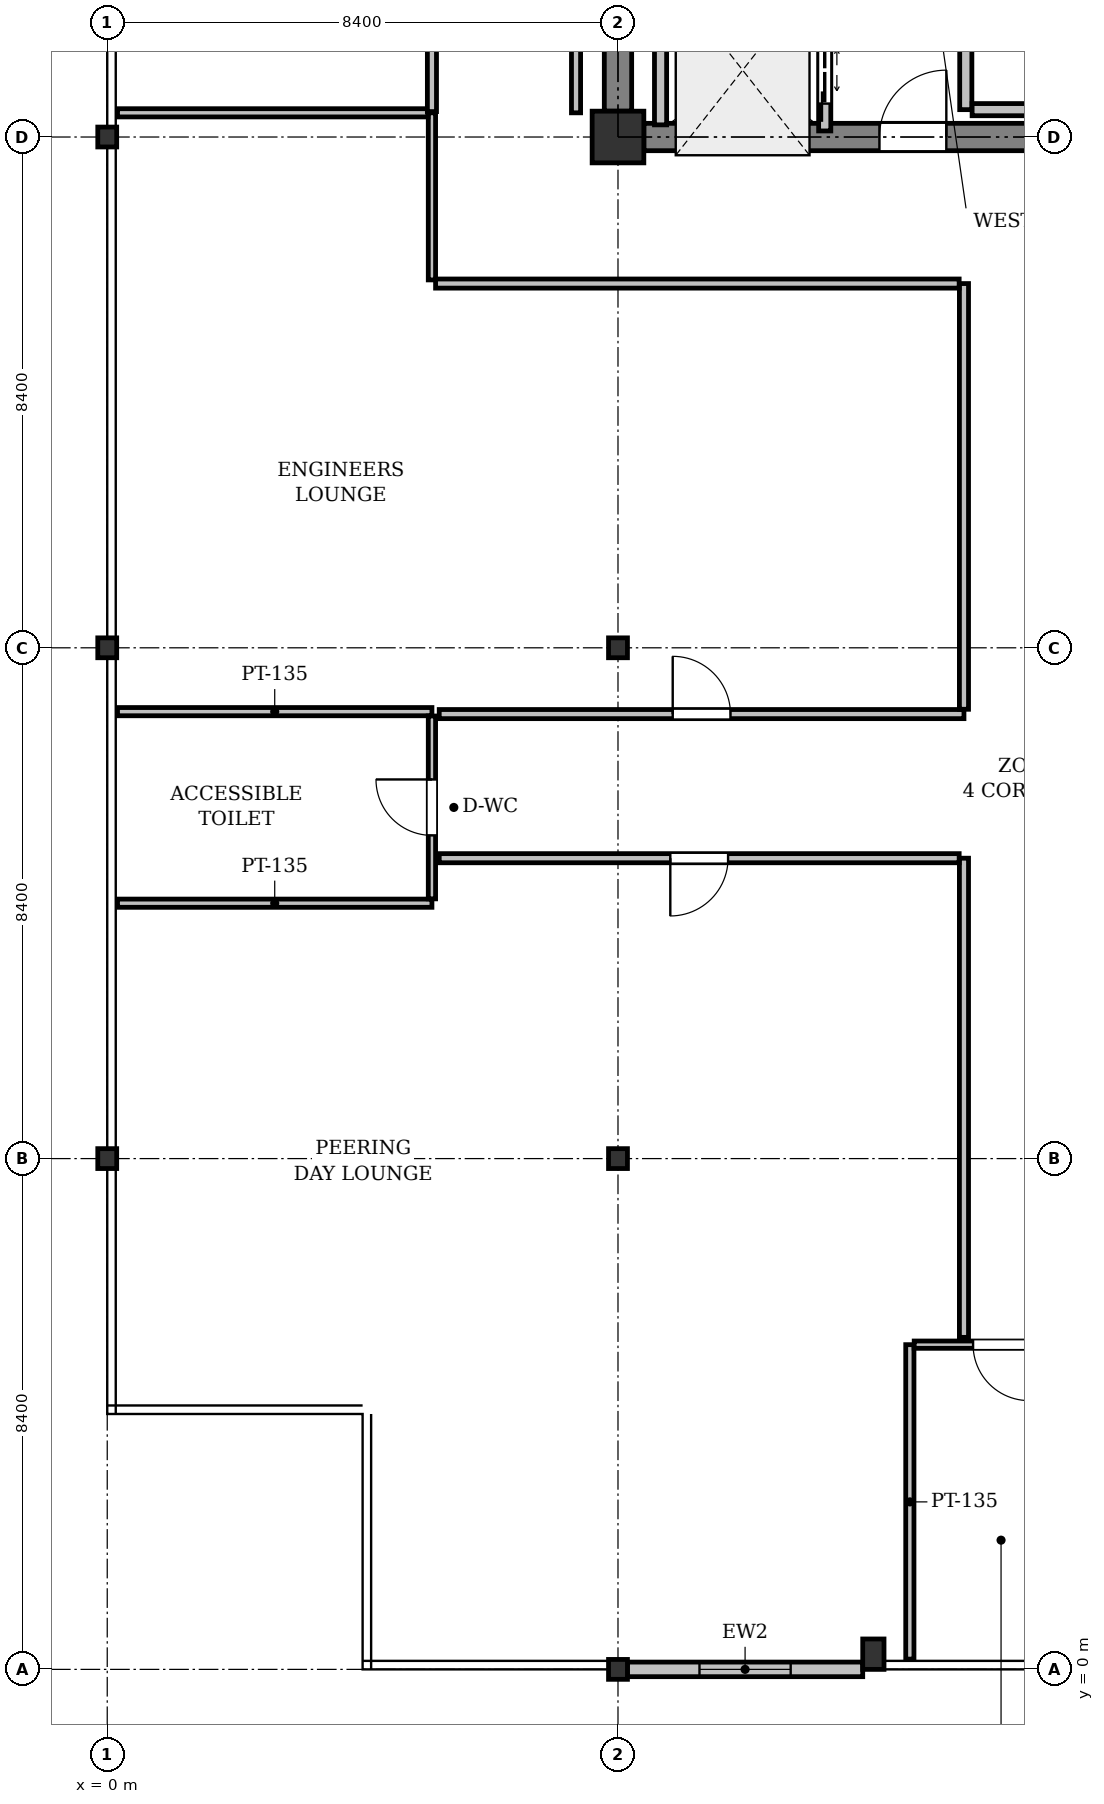
"""IFC4 building model, lengths in metres.
Left out: names, types, materials, properties, quantities, classifications, styles, units other than length and angle.
Written with IfcOpenShell. Run it as: python <this file> out.ifc"""

import sys

from ifc_helpers import new_model, si_unit, direction, frame, frame_2d, origin, origin_2d, place, context, subcontext, project, spatial, rectangle, i_section, extrude, element, fill, save


model = new_model("IFC4")
c1 = context("Model", 3, precision=1e-05, world=origin(), true_north=direction((0.0, 1.0)))
c2 = subcontext(c1, "Body", "Model", "MODEL_VIEW")
j1 = project(units=[si_unit("LENGTHUNIT", "METRE"), si_unit("PLANEANGLEUNIT", "RADIAN")], contexts=[c1])
p1 = place(None, origin())
s1 = spatial("IfcSite", under=j1, at=p1, CompositionType="ELEMENT")
p2 = place(p1, origin())
s2 = spatial("IfcBuilding", under=s1, at=p2, CompositionType="ELEMENT")
p3 = place(p2, frame((0.0, 0.0, 262.2)))
s3 = spatial("IfcBuildingStorey", under=s2, at=p3, CompositionType="ELEMENT", Elevation=262.2)
for number, where, z_axis, x_axis in (
    (1, (0.0, 8.4, 0.0), (0.0, 0.0, 1.0), (1.0, 0.0, 0.0)),
    (2, (0.0, 16.8, 0.0), (0.0, 0.0, 1.0), (1.0, 0.0, 0.0)),
    (3, (0.0, 25.2, 0.0), (0.0, 0.0, 1.0), (1.0, 0.0, 0.0)),
    (4, (8.4, 0.0, 0.0), (0.0, 0.0, 1.0), (1.0, 0.0, 0.0)),
    (5, (8.4, 8.4, 0.0), (0.0, 0.0, 1.0), (1.0, 0.0, 0.0)),
    (6, (8.4, 16.8, 0.0), (0.0, 0.0, 1.0), (1.0, 0.0, 0.0)),
):
    element("IfcColumn", number, at=place(p3, frame(where, z_axis=z_axis, x_axis=x_axis)), inside=s3, PredefinedType="COLUMN", context=c2, shape_type="SweptSolid", body=[
        extrude(i_section(OverallWidth=0.311, OverallDepth=0.327, WebThickness=0.016, FlangeThickness=0.025, FilletRadius=0.017, at=origin_2d()), origin(), (0.0, 0.0, 1.0), 4.0),
    ])
p4 = place(p3, frame((8.4, 25.2, 0.0), z_axis=(0.0, 0.0, 1.0), x_axis=(1.0, 0.0, 0.0)))
e7 = element("IfcColumn", 7, at=p4, inside=s3, PredefinedType="COLUMN", context=c2, shape_type="SweptSolid", body=[
    extrude(rectangle(XDim=0.85, YDim=0.85, at=origin_2d()), origin(), (0.0, 0.0, 1.0), 4.0),
])
p5 = place(p3, frame((12.6, 0.25, 0.0), z_axis=(0.0, 0.0, 1.0), x_axis=(1.0, 0.0, 0.0)))
e8 = element("IfcColumn", 8, at=p5, inside=s3, PredefinedType="PILASTER", context=c2, shape_type="SweptSolid", body=[
    extrude(rectangle(XDim=0.35, YDim=0.5, at=origin_2d()), origin(), (0.0, 0.0, 1.0), 4.0),
])
p6 = place(p3, frame((12.425, 0.0, 0.0), z_axis=(0.0, 0.0, 1.0), x_axis=(-1.0, 0.0, 0.0)))
e9 = element("IfcWall", 9, at=p6, inside=s3, PredefinedType="STANDARD", context=c2, shape_type="SweptSolid", body=[
    extrude(rectangle(XDim=3.87, YDim=0.24, at=frame_2d((1.935, 0.0))), origin(), (0.0, 0.0, 1.0), 3.475),
])
p7 = place(p6, frame((1.185, 0.0, 0.9)))
e10 = element("IfcOpeningElement", 10, at=p7, cuts=e9, PredefinedType="OPENING", context=c2, shape_type="SweptSolid", body=[
    extrude(rectangle(XDim=1.5, YDim=1.6, at=frame_2d((0.75, 0.8))), frame((0.0, 0.13, 0.0), z_axis=(0.0, -1.0, 0.0), x_axis=(1.0, 0.0, 0.0)), (0.0, 0.0, 1.0), 0.26),
])
p8 = place(p3, frame((8.4, 25.625, 0.0), z_axis=(0.0, 0.0, 1.0), x_axis=(0.0, 1.0, 0.0)))
e11 = element("IfcWall", 11, at=p8, inside=s3, PredefinedType="SHEAR", context=c2, shape_type="SweptSolid", body=[
    extrude(rectangle(XDim=7.55, YDim=0.45, at=frame_2d((3.775, 0.0))), origin(), (0.0, 0.0, 1.0), 3.725),
])
p9 = place(p3, frame((8.825, 25.2, 0.0), z_axis=(0.0, 0.0, 1.0), x_axis=(1.0, 0.0, 0.0)))
e12 = element("IfcWall", 12, at=p9, inside=s3, PredefinedType="SHEAR", context=c2, shape_type="SweptSolid", body=[
    extrude(rectangle(XDim=7.55, YDim=0.45, at=frame_2d((3.775, 0.0))), origin(), (0.0, 0.0, 1.0), 3.725),
])
p10 = place(p9, frame((3.875, 0.0, 0.0)))
e13 = element("IfcOpeningElement", 13, at=p10, cuts=e12, PredefinedType="OPENING", context=c2, shape_type="SweptSolid", body=[
    extrude(rectangle(XDim=1.1, YDim=2.15, at=frame_2d((0.55, 1.075))), frame((0.0, 0.235, 0.0), z_axis=(0.0, -1.0, 0.0), x_axis=(1.0, 0.0, 0.0)), (0.0, 0.0, 1.0), 0.47),
])
p11 = place(p3, frame((11.8, 25.3, 0.0), z_axis=(0.0, 0.0, 1.0), x_axis=(0.0, 1.0, 0.0)))
e14 = element("IfcWall", 14, at=p11, inside=s3, PredefinedType="PARTITIONING", context=c2, shape_type="SweptSolid", body=[
    extrude(rectangle(XDim=2.0, YDim=0.2, at=frame_2d((1.0, 0.0))), origin(), (0.0, 0.0, 1.0), 3.725),
])
p12 = place(p11, frame((0.45, 0.0, 0.0)))
e15 = element("IfcOpeningElement", 15, at=p12, cuts=e14, PredefinedType="OPENING", context=c2, shape_type="SweptSolid", body=[
    extrude(rectangle(XDim=1.1, YDim=2.2, at=frame_2d((0.55, 1.1))), frame((0.0, 0.11, 0.0), z_axis=(0.0, -1.0, 0.0), x_axis=(1.0, 0.0, 0.0)), (0.0, 0.0, 1.0), 0.22),
])
p13 = place(p3, frame((9.1, 25.4, 0.0), z_axis=(0.0, 0.0, 1.0), x_axis=(0.0, 1.0, 0.0)))
e16 = element("IfcWall", 16, at=p13, inside=s3, PredefinedType="PARTITIONING", context=c2, shape_type="SweptSolid", body=[
    extrude(rectangle(XDim=1.8, YDim=0.2, at=frame_2d((0.9, 0.0))), origin(), (0.0, 0.0, 1.0), 3.725),
])
p14 = place(p3, frame((14.12, 30.746, 0.0), z_axis=(0.0, 0.0, 1.0), x_axis=(0.0, -1.0, 0.0)))
e17 = element("IfcWall", 17, at=p14, inside=s3, PredefinedType="PARTITIONING", context=c2, shape_type="SweptSolid", body=[
    extrude(rectangle(XDim=5.096, YDim=0.2, at=frame_2d((2.548, 0.0))), origin(), (0.0, 0.0, 1.0), 3.725),
])
p15 = place(p14, frame((2.123, 0.0, 0.0)))
e18 = element("IfcOpeningElement", 18, at=p15, cuts=e17, PredefinedType="OPENING", context=c2, shape_type="SweptSolid", body=[
    extrude(rectangle(XDim=0.85, YDim=2.15, at=frame_2d((0.425, 1.075))), frame((0.0, 0.11, 0.0), z_axis=(0.0, -1.0, 0.0), x_axis=(1.0, 0.0, 0.0)), (0.0, 0.0, 1.0), 0.22),
])
p16 = place(p3, frame((14.224, 25.65, 0.0), z_axis=(0.0, 0.0, 1.0), x_axis=(1.0, 0.0, 0.0)))
e19 = element("IfcWall", 19, at=p16, inside=s3, PredefinedType="PARTITIONING", context=c2, shape_type="SweptSolid", body=[
    extrude(rectangle(XDim=2.122, YDim=0.2, at=frame_2d((1.061, 0.0))), origin(), (0.0, 0.0, 1.0), 3.725),
])
for number, where, z_axis, x_axis in (
    (20, (5.34, 15.75, 0.0), (0.0, 0.0, 1.0), (-1.0, 0.0, 0.0)),
    (21, (0.169, 12.6, 0.0), (0.0, 0.0, 1.0), (1.0, 0.0, 0.0)),
):
    element("IfcWall", number, at=place(p3, frame(where, z_axis=z_axis, x_axis=x_axis)), inside=s3, PredefinedType="PARTITIONING", context=c2, shape_type="SweptSolid", body=[
        extrude(rectangle(XDim=5.171, YDim=0.135, at=frame_2d((2.585, 0.0))), origin(), (0.0, 0.0, 1.0), 3.421),
    ])
p17 = place(p3, frame((5.34, 12.671, 0.0), z_axis=(0.0, 0.0, 1.0), x_axis=(0.0, 1.0, 0.0)))
e22 = element("IfcWall", 22, at=p17, inside=s3, PredefinedType="PARTITIONING", context=c2, shape_type="SweptSolid", body=[
    extrude(rectangle(XDim=3.007, YDim=0.12, at=frame_2d((1.503, 0.0))), origin(), (0.0, 0.0, 1.0), 3.725),
])
p18 = place(p17, frame((1.043, 0.0, 0.0)))
e23 = element("IfcOpeningElement", 23, at=p18, cuts=e22, PredefinedType="OPENING", context=c2, shape_type="SweptSolid", body=[
    extrude(rectangle(XDim=0.92, YDim=2.1, at=frame_2d((0.46, 1.05))), frame((0.0, 0.07, 0.0), z_axis=(0.0, -1.0, 0.0), x_axis=(1.0, 0.0, 0.0)), (0.0, 0.0, 1.0), 0.14),
])
p19 = place(p3, frame((13.2, 5.34, 0.0), z_axis=(0.0, 0.0, 1.0), x_axis=(0.0, -1.0, 0.0)))
e24 = element("IfcWall", 24, at=p19, inside=s3, PredefinedType="PARTITIONING", context=c2, shape_type="SweptSolid", body=[
    extrude(rectangle(XDim=5.171, YDim=0.135, at=frame_2d((2.585, 0.0))), origin(), (0.0, 0.0, 1.0), 3.725),
])
p20 = place(p3, frame((16.128, 5.34, 0.0), z_axis=(0.0, 0.0, 1.0), x_axis=(-1.0, 0.0, 0.0)))
e25 = element("IfcWall", 25, at=p20, inside=s3, PredefinedType="PARTITIONING", context=c2, shape_type="SweptSolid", body=[
    extrude(rectangle(XDim=2.857, YDim=0.12, at=frame_2d((1.428, 0.0))), origin(), (0.0, 0.0, 1.0), 3.725),
])
p21 = place(p20, frame((0.969, 0.0, 0.0)))
e26 = element("IfcOpeningElement", 26, at=p21, cuts=e25, PredefinedType="OPENING", context=c2, shape_type="SweptSolid", body=[
    extrude(rectangle(XDim=0.92, YDim=2.1, at=frame_2d((0.46, 1.05))), frame((0.0, 0.07, 0.0), z_axis=(0.0, -1.0, 0.0), x_axis=(1.0, 0.0, 0.0)), (0.0, 0.0, 1.0), 0.14),
])
p22 = place(p3, frame((5.34, 22.85, 0.0), z_axis=(0.0, 0.0, 1.0), x_axis=(0.0, 1.0, 0.0)))
e27 = element("IfcWall", 27, at=p22, inside=s3, PredefinedType="PARTITIONING", context=c2, shape_type="SweptSolid", body=[
    extrude(rectangle(XDim=2.748, YDim=0.12, at=frame_2d((1.374, 0.0))), origin(), (0.0, 0.0, 1.0), 3.271),
])
p23 = place(p3, frame((5.276, 25.598, 0.0), z_axis=(0.0, 0.0, 1.0), x_axis=(-1.0, 0.0, 0.0)))
e28 = element("IfcWall", 28, at=p23, inside=s3, PredefinedType="PARTITIONING", context=c2, shape_type="SweptSolid", body=[
    extrude(rectangle(XDim=5.107, YDim=0.135, at=frame_2d((2.553, 0.0))), origin(), (0.0, 0.0, 1.0), 3.421),
])
p24 = place(p3, frame((5.46, 15.71, 0.0), z_axis=(0.0, 0.0, 1.0), x_axis=(1.0, 0.0, 0.0)))
e29 = element("IfcWall", 29, at=p24, inside=s3, PredefinedType="PARTITIONING", context=c2, shape_type="SweptSolid", body=[
    extrude(rectangle(XDim=8.63, YDim=0.15, at=frame_2d((4.315, 0.0))), origin(), (0.0, 0.0, 1.0), 3.319),
])
p25 = place(p24, frame((3.84, 0.0, 0.0)))
e30 = element("IfcOpeningElement", 30, at=p25, cuts=e29, PredefinedType="OPENING", context=c2, shape_type="SweptSolid", body=[
    extrude(rectangle(XDim=0.95, YDim=2.15, at=frame_2d((0.475, 1.075))), frame((0.0, 0.085, 0.0), z_axis=(0.0, -1.0, 0.0), x_axis=(1.0, 0.0, 0.0)), (0.0, 0.0, 1.0), 0.17),
])
p26 = place(p3, frame((14.09, 15.789, 0.0), z_axis=(0.0, 0.0, 1.0), x_axis=(0.0, 1.0, 0.0)))
e31 = element("IfcWall", 31, at=p26, inside=s3, PredefinedType="PARTITIONING", context=c2, shape_type="SweptSolid", body=[
    extrude(rectangle(XDim=7.001, YDim=0.15, at=frame_2d((3.5, 0.0))), origin(), (0.0, 0.0, 1.0), 3.271),
])
p27 = place(p3, frame((14.011, 22.79, 0.0), z_axis=(0.0, 0.0, 1.0), x_axis=(-1.0, 0.0, 0.0)))
e32 = element("IfcWall", 32, at=p27, inside=s3, PredefinedType="PARTITIONING", context=c2, shape_type="SweptSolid", body=[
    extrude(rectangle(XDim=8.611, YDim=0.15, at=frame_2d((4.306, 0.0))), origin(), (0.0, 0.0, 1.0), 3.319),
])
p28 = place(p3, frame((14.09, 5.46, 0.0), z_axis=(0.0, 0.0, 1.0), x_axis=(0.0, 1.0, 0.0)))
e33 = element("IfcWall", 33, at=p28, inside=s3, PredefinedType="PARTITIONING", context=c2, shape_type="SweptSolid", body=[
    extrude(rectangle(XDim=7.88, YDim=0.15, at=frame_2d((3.94, 0.0))), origin(), (0.0, 0.0, 1.0), 3.271),
])
p29 = place(p3, frame((14.011, 13.34, 0.0), z_axis=(0.0, 0.0, 1.0), x_axis=(-1.0, 0.0, 0.0)))
e34 = element("IfcWall", 34, at=p29, inside=s3, PredefinedType="PARTITIONING", context=c2, shape_type="SweptSolid", body=[
    extrude(rectangle(XDim=8.551, YDim=0.15, at=frame_2d((4.275, 0.0))), origin(), (0.0, 0.0, 1.0), 3.319),
])
p30 = place(p29, frame((3.801, 0.0, 0.0)))
e35 = element("IfcOpeningElement", 35, at=p30, cuts=e34, PredefinedType="OPENING", context=c2, shape_type="SweptSolid", body=[
    extrude(rectangle(XDim=0.95, YDim=2.15, at=frame_2d((0.475, 1.075))), frame((0.0, 0.085, 0.0), z_axis=(0.0, -1.0, 0.0), x_axis=(1.0, 0.0, 0.0)), (0.0, 0.0, 1.0), 0.17),
])
p31 = place(p3, frame((5.34, 25.618, 0.0), z_axis=(0.0, 0.0, 1.0), x_axis=(0.0, 1.0, 0.0)))
e36 = element("IfcWall", 36, at=p31, inside=s3, PredefinedType="PARTITIONING", context=c2, shape_type="SweptSolid", body=[
    extrude(rectangle(XDim=10.582, YDim=0.15, at=frame_2d((5.291, 0.0))), origin(), (0.0, 0.0, 1.0), 3.271),
])
p32 = place(p3, frame((7.71, 36.2, 0.0), z_axis=(0.0, 0.0, 1.0), x_axis=(0.0, -1.0, 0.0)))
e37 = element("IfcWall", 37, at=p32, inside=s3, PredefinedType="PARTITIONING", context=c2, shape_type="SweptSolid", body=[
    extrude(rectangle(XDim=10.602, YDim=0.15, at=frame_2d((5.301, 0.0))), origin(), (0.0, 0.0, 1.0), 3.271),
])
p33 = place(p7, origin())
e38 = element("IfcWindow", 38, at=p33, inside=s3, PartitioningType="SINGLE_PANEL", PredefinedType="WINDOW", context=c2, shape_type="SweptSolid", body=[
    extrude(rectangle(XDim=1.5, YDim=1.6, at=frame_2d((0.75, 0.8))), frame((0.0, 0.03, 0.0), z_axis=(0.0, -1.0, 0.0), x_axis=(1.0, 0.0, 0.0)), (0.0, 0.0, 1.0), 0.06),
])
fill(e10, e38)
p34 = place(p10, origin())
e39 = element("IfcDoor", 39, at=p34, inside=s3, OperationType="SINGLE_SWING_RIGHT", PredefinedType="DOOR", context=c2, shape_type="SweptSolid", body=[
    extrude(rectangle(XDim=1.1, YDim=2.15, at=frame_2d((0.55, 1.075))), frame((0.0, 0.025, 0.0), z_axis=(0.0, -1.0, 0.0), x_axis=(1.0, 0.0, 0.0)), (0.0, 0.0, 1.0), 0.05),
])
fill(e13, e39)
p35 = place(p12, origin())
e40 = element("IfcDoor", 40, at=p35, inside=s3, OperationType="DOUBLE_DOOR_SLIDING", PredefinedType="DOOR", context=c2, shape_type="SweptSolid", body=[
    extrude(rectangle(XDim=1.1, YDim=2.2, at=frame_2d((0.55, 1.1))), frame((0.0, 0.025, 0.0), z_axis=(0.0, -1.0, 0.0), x_axis=(1.0, 0.0, 0.0)), (0.0, 0.0, 1.0), 0.05),
])
fill(e15, e40)
p36 = place(p18, origin())
e41 = element("IfcDoor", 41, at=p36, inside=s3, OperationType="SINGLE_SWING_RIGHT", PredefinedType="DOOR", context=c2, shape_type="SweptSolid", body=[
    extrude(rectangle(XDim=0.92, YDim=2.1, at=frame_2d((0.46, 1.05))), frame((0.0, 0.025, 0.0), z_axis=(0.0, -1.0, 0.0), x_axis=(1.0, 0.0, 0.0)), (0.0, 0.0, 1.0), 0.05),
])
fill(e23, e41)
p37 = place(p21, origin())
e42 = element("IfcDoor", 42, at=p37, inside=s3, OperationType="SINGLE_SWING_LEFT", PredefinedType="DOOR", context=c2, shape_type="SweptSolid", body=[
    extrude(rectangle(XDim=0.92, YDim=2.1, at=frame_2d((0.46, 1.05))), frame((0.0, 0.025, 0.0), z_axis=(0.0, -1.0, 0.0), x_axis=(1.0, 0.0, 0.0)), (0.0, 0.0, 1.0), 0.05),
])
fill(e26, e42)
p38 = place(p25, origin())
e43 = element("IfcDoor", 43, at=p38, inside=s3, OperationType="SINGLE_SWING_LEFT", PredefinedType="DOOR", context=c2, shape_type="SweptSolid", body=[
    extrude(rectangle(XDim=0.95, YDim=2.15, at=frame_2d((0.475, 1.075))), frame((0.0, 0.025, 0.0), z_axis=(0.0, -1.0, 0.0), x_axis=(1.0, 0.0, 0.0)), (0.0, 0.0, 1.0), 0.05),
])
fill(e30, e43)
p39 = place(p30, origin())
e44 = element("IfcDoor", 44, at=p39, inside=s3, OperationType="SINGLE_SWING_RIGHT", PredefinedType="DOOR", context=c2, shape_type="SweptSolid", body=[
    extrude(rectangle(XDim=0.95, YDim=2.15, at=frame_2d((0.475, 1.075))), frame((0.0, 0.025, 0.0), z_axis=(0.0, -1.0, 0.0), x_axis=(1.0, 0.0, 0.0)), (0.0, 0.0, 1.0), 0.05),
])
fill(e35, e44)
save(model, sys.argv[1])
